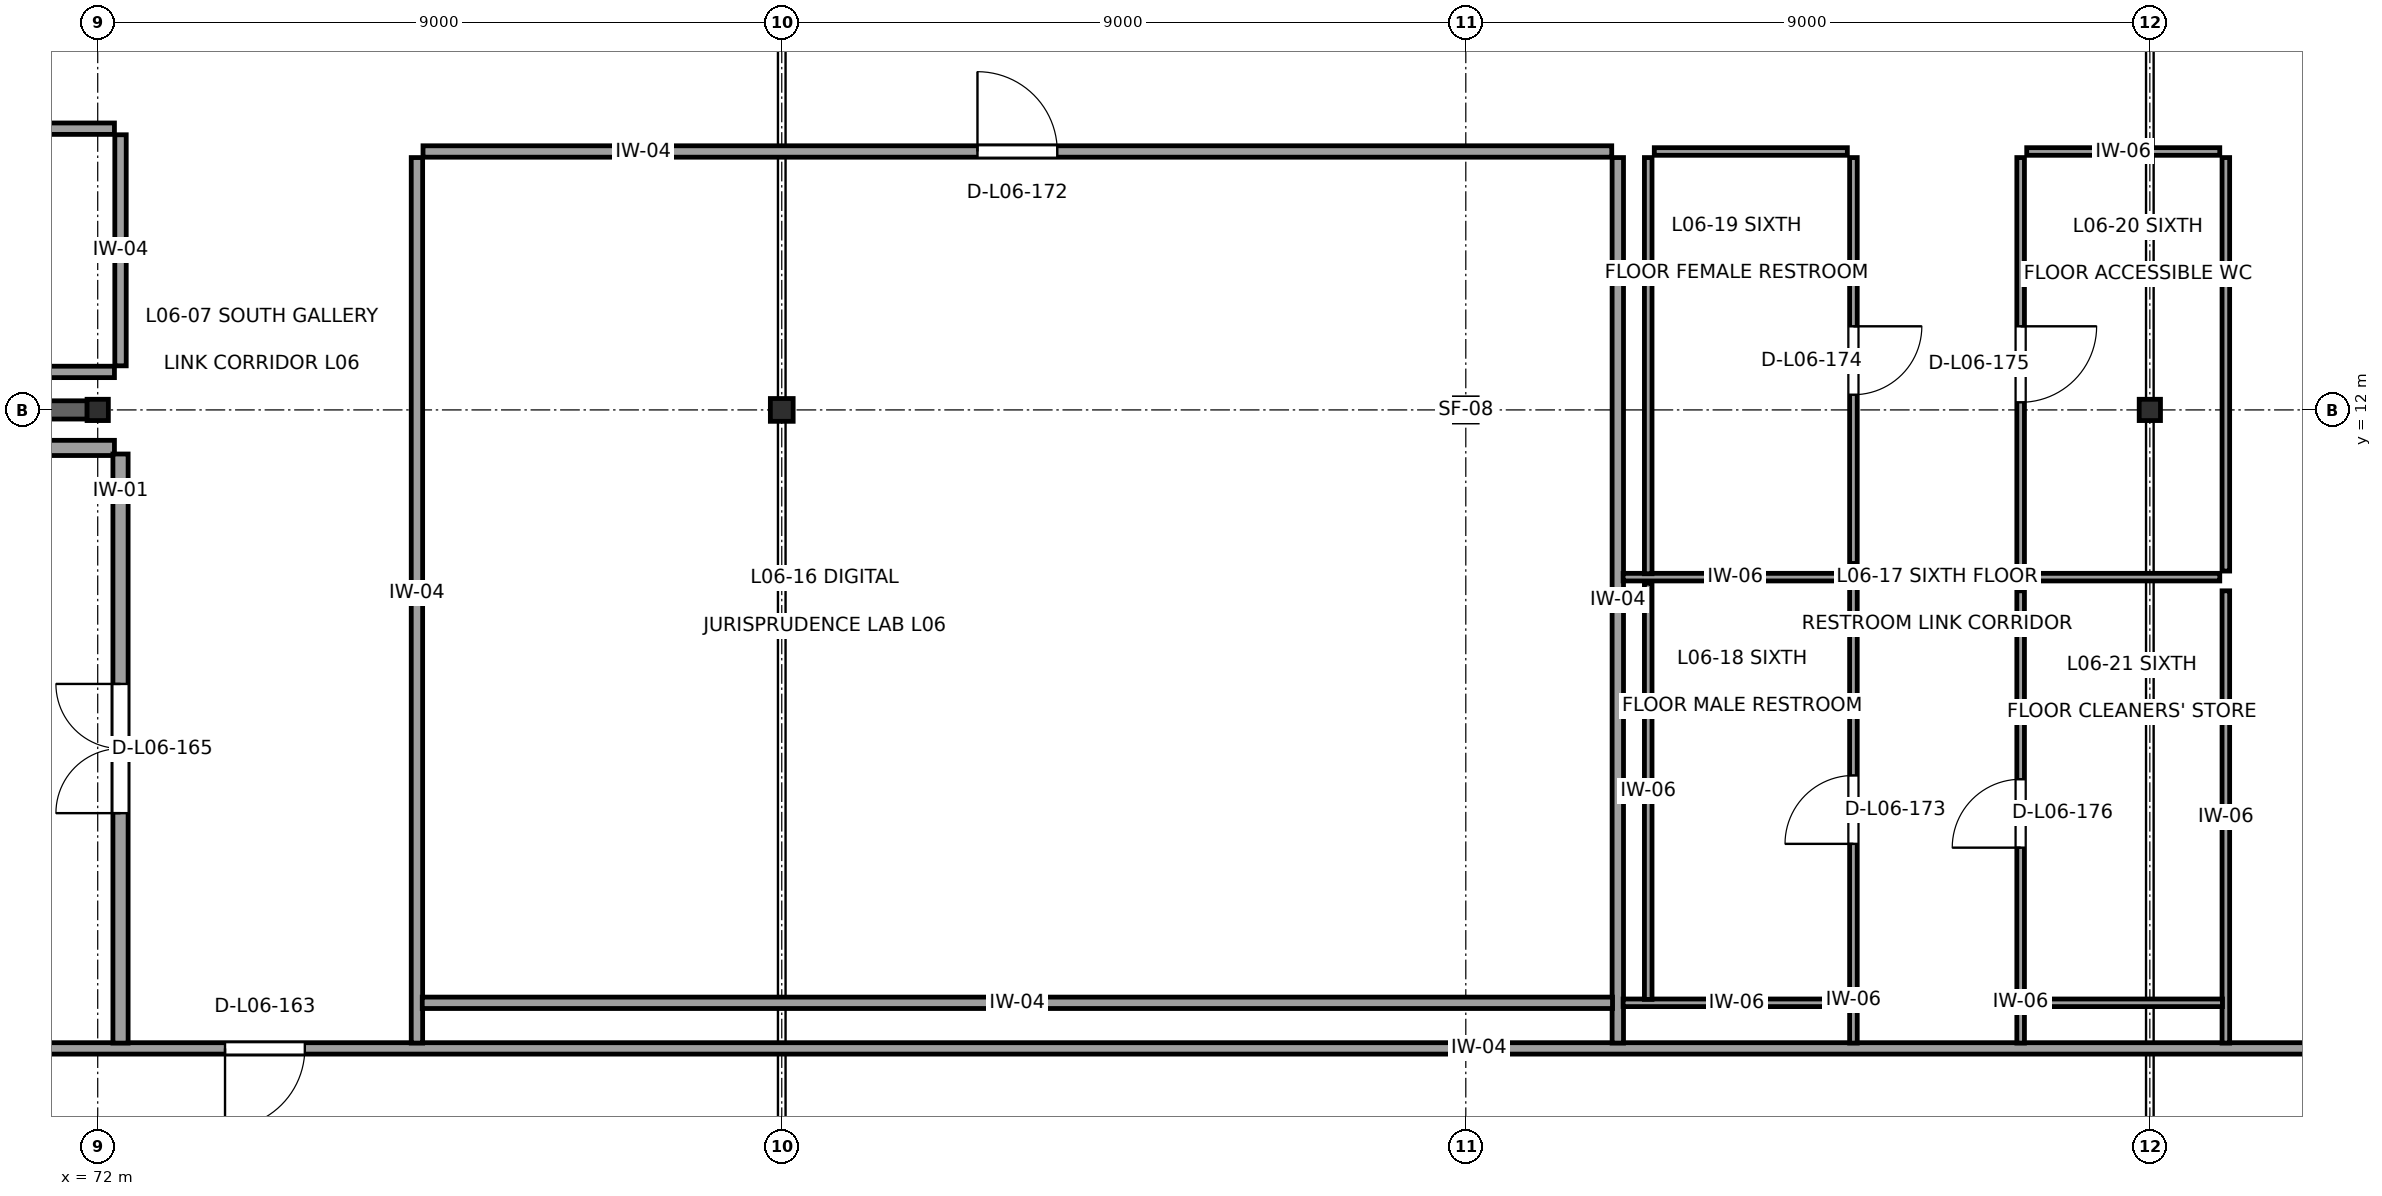
"""IFC4 building model, lengths in metres.
Left out: names, types, materials, properties, quantities, classifications, styles, units other than length and angle.
Written with IfcOpenShell. Run it as: python <this file> out.ifc"""

import sys

from ifc_helpers import new_model, si_unit, direction, frame, frame_2d, origin, origin_2d, place, context, subcontext, project, spatial, rectangle, i_section, extrude, element, fill, save


model = new_model("IFC4")
c1 = context("Model", 3, precision=1e-05, world=origin(), true_north=direction((0.0, 1.0)))
c2 = subcontext(c1, "Body", "Model", "MODEL_VIEW")
j1 = project(units=[si_unit("LENGTHUNIT", "METRE"), si_unit("PLANEANGLEUNIT", "RADIAN")], contexts=[c1])
p1 = place(None, origin())
s1 = spatial("IfcSite", under=j1, at=p1, CompositionType="ELEMENT")
p2 = place(p1, origin())
s2 = spatial("IfcBuilding", under=s1, at=p2, CompositionType="ELEMENT")
p3 = place(p2, frame((0.0, 0.0, 27.4)))
s3 = spatial("IfcBuildingStorey", under=s2, at=p3, CompositionType="ELEMENT", Elevation=27.4)
p4 = place(p3, frame((72.0, 12.0, 0.0), z_axis=(0.0, 0.0, 1.0), x_axis=(0.0, 1.0, 0.0)))
e1 = element("IfcColumn", 1, at=p4, inside=s3, PredefinedType="COLUMN", context=c2, shape_type="SweptSolid", body=[
    extrude(i_section(OverallWidth=0.28, OverallDepth=0.28, WebThickness=0.01, FlangeThickness=0.018, at=origin_2d()), origin(), (0.0, 0.0, 1.0), 4.0),
])
p5 = place(p3, frame((81.0, 12.0, 0.0), z_axis=(0.0, 0.0, 1.0), x_axis=(1.0, 0.0, 0.0)))
e2 = element("IfcColumn", 2, at=p5, inside=s3, PredefinedType="COLUMN", context=c2, shape_type="SweptSolid", body=[
    extrude(i_section(OverallWidth=0.3, OverallDepth=0.3, WebThickness=0.011, FlangeThickness=0.019, at=origin_2d()), origin(), (0.0, 0.0, 1.0), 4.0),
])
p6 = place(p3, frame((90.0, 12.0, 0.0), z_axis=(0.0, 0.0, 1.0), x_axis=(1.0, 0.0, 0.0)))
e3 = element("IfcColumn", 3, at=p6, inside=s3, PredefinedType="COLUMN", context=c2, shape_type="SweptSolid", body=[
    extrude(i_section(OverallWidth=0.3, OverallDepth=0.32, WebThickness=0.011, FlangeThickness=0.021, at=origin_2d()), origin(), (0.0, 0.0, 1.0), 4.0),
])
p7 = place(p3, frame((99.0, 12.0, 0.0), z_axis=(0.0, 0.0, 1.0), x_axis=(1.0, 0.0, 0.0)))
e4 = element("IfcColumn", 4, at=p7, inside=s3, PredefinedType="COLUMN", context=c2, shape_type="SweptSolid", body=[
    extrude(i_section(OverallWidth=0.28, OverallDepth=0.28, WebThickness=0.01, FlangeThickness=0.018, at=origin_2d()), origin(), (0.0, 0.0, 1.0), 4.0),
])
p8 = place(p3, frame((63.008, 12.0, 0.0), z_axis=(0.0, 0.0, 1.0), x_axis=(1.0, 0.0, 0.0)))
e5 = element("IfcWall", 5, at=p8, inside=s3, PredefinedType="SHEAR", context=c2, shape_type="SweptSolid", body=[
    extrude(rectangle(XDim=8.854, YDim=0.24, at=frame_2d((4.427, 0.0))), origin(), (0.0, 0.0, 1.0), 3.355),
])
p9 = place(p3, frame((45.88, 3.6, 0.0), z_axis=(0.0, 0.0, 1.0), x_axis=(1.0, 0.0, 0.0)))
e6 = element("IfcWall", 6, at=p9, inside=s3, PredefinedType="PARTITIONING", context=c2, shape_type="SweptSolid", body=[
    extrude(rectangle(XDim=58.24, YDim=0.15, at=frame_2d((29.12, 0.0))), origin(), (0.0, 0.0, 1.0), 3.64),
])
p10 = place(p9, frame((27.795, 0.0, 0.0)))
e7 = element("IfcOpeningElement", 7, at=p10, cuts=e6, PredefinedType="OPENING", context=c2, shape_type="SweptSolid", body=[
    extrude(rectangle(XDim=1.05, YDim=2.25, at=frame_2d((0.525, 1.125))), frame((0.0, 0.09, 0.0), z_axis=(0.0, -1.0, 0.0), x_axis=(1.0, 0.0, 0.0)), (0.0, 0.0, 1.0), 0.18),
])
p11 = place(p3, frame((62.795, 11.5, 0.0), z_axis=(0.0, 0.0, 1.0), x_axis=(1.0, 0.0, 0.0)))
e8 = element("IfcWall", 8, at=p11, inside=s3, PredefinedType="PARTITIONING", context=c2, shape_type="SweptSolid", body=[
    extrude(rectangle(XDim=9.425, YDim=0.2, at=frame_2d((4.712, 0.0))), origin(), (0.0, 0.0, 1.0), 3.64),
])
p12 = place(p3, frame((72.3, 11.42, 0.0), z_axis=(0.0, 0.0, 1.0), x_axis=(0.0, -1.0, 0.0)))
e9 = element("IfcWall", 9, at=p12, inside=s3, PredefinedType="PARTITIONING", context=c2, shape_type="SweptSolid", body=[
    extrude(rectangle(XDim=7.75, YDim=0.2, at=frame_2d((3.875, 0.0))), origin(), (0.0, 0.0, 1.0), 3.64),
])
p13 = place(p12, frame((3.025, 0.0, 0.0)))
e10 = element("IfcOpeningElement", 10, at=p13, cuts=e9, PredefinedType="OPENING", context=c2, shape_type="SweptSolid", body=[
    extrude(rectangle(XDim=1.7, YDim=2.4, at=frame_2d((0.85, 1.2))), frame((0.0, 0.115, 0.0), z_axis=(0.0, -1.0, 0.0), x_axis=(1.0, 0.0, 0.0)), (0.0, 0.0, 1.0), 0.23),
])
p14 = place(p3, frame((72.22, 12.5, 0.0), z_axis=(0.0, 0.0, 1.0), x_axis=(-1.0, 0.0, 0.0)))
e11 = element("IfcWall", 11, at=p14, inside=s3, PredefinedType="PARTITIONING", context=c2, shape_type="SweptSolid", body=[
    extrude(rectangle(XDim=9.425, YDim=0.15, at=frame_2d((4.712, 0.0))), origin(), (0.0, 0.0, 1.0), 3.64),
])
p15 = place(p3, frame((62.795, 15.7, 0.0), z_axis=(0.0, 0.0, 1.0), x_axis=(1.0, 0.0, 0.0)))
e12 = element("IfcWall", 12, at=p15, inside=s3, PredefinedType="PARTITIONING", context=c2, shape_type="SweptSolid", body=[
    extrude(rectangle(XDim=9.425, YDim=0.15, at=frame_2d((4.712, 0.0))), origin(), (0.0, 0.0, 1.0), 3.64),
])
p16 = place(p15, frame((4.187, 0.0, 0.0)))
e13 = element("IfcOpeningElement", 13, at=p16, cuts=e12, PredefinedType="OPENING", context=c2, shape_type="SweptSolid", body=[
    extrude(rectangle(XDim=1.05, YDim=2.25, at=frame_2d((0.525, 1.125))), frame((0.0, 0.09, 0.0), z_axis=(0.0, -1.0, 0.0), x_axis=(1.0, 0.0, 0.0)), (0.0, 0.0, 1.0), 0.18),
])
p17 = place(p3, frame((72.3, 15.62, 0.0), z_axis=(0.0, 0.0, 1.0), x_axis=(0.0, -1.0, 0.0)))
e14 = element("IfcWall", 14, at=p17, inside=s3, PredefinedType="PARTITIONING", context=c2, shape_type="SweptSolid", body=[
    extrude(rectangle(XDim=3.04, YDim=0.15, at=frame_2d((1.52, 0.0))), origin(), (0.0, 0.0, 1.0), 3.64),
])
p18 = place(p3, frame((76.2, 3.67, 0.0), z_axis=(0.0, 0.0, 1.0), x_axis=(0.0, 1.0, 0.0)))
e15 = element("IfcWall", 15, at=p18, inside=s3, PredefinedType="PARTITIONING", context=c2, shape_type="SweptSolid", body=[
    extrude(rectangle(XDim=11.65, YDim=0.15, at=frame_2d((5.825, 0.0))), origin(), (0.0, 0.0, 1.0), 3.64),
])
p19 = place(p3, frame((76.28, 15.4, 0.0), z_axis=(0.0, 0.0, 1.0), x_axis=(1.0, 0.0, 0.0)))
e16 = element("IfcWall", 16, at=p19, inside=s3, PredefinedType="PARTITIONING", context=c2, shape_type="SweptSolid", body=[
    extrude(rectangle(XDim=15.64, YDim=0.15, at=frame_2d((7.82, 0.0))), origin(), (0.0, 0.0, 1.0), 3.64),
])
p20 = place(p19, frame((7.295, 0.0, 0.0)))
e17 = element("IfcOpeningElement", 17, at=p20, cuts=e16, PredefinedType="OPENING", context=c2, shape_type="SweptSolid", body=[
    extrude(rectangle(XDim=1.05, YDim=2.25, at=frame_2d((0.525, 1.125))), frame((0.0, 0.09, 0.0), z_axis=(0.0, -1.0, 0.0), x_axis=(1.0, 0.0, 0.0)), (0.0, 0.0, 1.0), 0.18),
])
p21 = place(p3, frame((92.0, 15.32, 0.0), z_axis=(0.0, 0.0, 1.0), x_axis=(0.0, -1.0, 0.0)))
e18 = element("IfcWall", 18, at=p21, inside=s3, PredefinedType="PARTITIONING", context=c2, shape_type="SweptSolid", body=[
    extrude(rectangle(XDim=11.65, YDim=0.15, at=frame_2d((5.825, 0.0))), origin(), (0.0, 0.0, 1.0), 3.64),
])
p22 = place(p3, frame((91.93, 4.2, 0.0), z_axis=(0.0, 0.0, 1.0), x_axis=(-1.0, 0.0, 0.0)))
e19 = element("IfcWall", 19, at=p22, inside=s3, PredefinedType="PARTITIONING", context=c2, shape_type="SweptSolid", body=[
    extrude(rectangle(XDim=15.66, YDim=0.15, at=frame_2d((7.83, 0.0))), origin(), (0.0, 0.0, 1.0), 3.64),
])
p23 = place(p3, frame((95.1, 9.72, 0.0), z_axis=(0.0, 0.0, 1.0), x_axis=(0.0, -1.0, 0.0)))
e20 = element("IfcWall", 20, at=p23, inside=s3, PredefinedType="PARTITIONING", context=c2, shape_type="SweptSolid", body=[
    extrude(rectangle(XDim=6.05, YDim=0.1, at=frame_2d((3.025, 0.0))), origin(), (0.0, 0.0, 1.0), 3.64),
])
p24 = place(p23, frame((2.529, 0.0, 0.0)))
e21 = element("IfcOpeningElement", 21, at=p24, cuts=e20, PredefinedType="OPENING", context=c2, shape_type="SweptSolid", body=[
    extrude(rectangle(XDim=0.9, YDim=2.05, at=frame_2d((0.45, 1.025))), frame((0.0, 0.065, 0.0), z_axis=(0.0, -1.0, 0.0), x_axis=(1.0, 0.0, 0.0)), (0.0, 0.0, 1.0), 0.13),
])
p25 = place(p3, frame((95.055, 4.2, 0.0), z_axis=(0.0, 0.0, 1.0), x_axis=(-1.0, 0.0, 0.0)))
e22 = element("IfcWall", 22, at=p25, inside=s3, PredefinedType="PARTITIONING", context=c2, shape_type="SweptSolid", body=[
    extrude(rectangle(XDim=2.985, YDim=0.1, at=frame_2d((1.492, 0.0))), origin(), (0.0, 0.0, 1.0), 3.64),
])
p26 = place(p3, frame((92.4, 4.245, 0.0), z_axis=(0.0, 0.0, 1.0), x_axis=(0.0, 1.0, 0.0)))
e23 = element("IfcWall", 23, at=p26, inside=s3, PredefinedType="PARTITIONING", context=c2, shape_type="SweptSolid", body=[
    extrude(rectangle(XDim=5.475, YDim=0.1, at=frame_2d((2.737, 0.0))), origin(), (0.0, 0.0, 1.0), 3.64),
])
p27 = place(p3, frame((92.07, 9.8, 0.0), z_axis=(0.0, 0.0, 1.0), x_axis=(1.0, 0.0, 0.0)))
e24 = element("IfcWall", 24, at=p27, inside=s3, PredefinedType="PARTITIONING", context=c2, shape_type="SweptSolid", body=[
    extrude(rectangle(XDim=2.95, YDim=0.1, at=frame_2d((1.475, 0.0))), origin(), (0.0, 0.0, 1.0), 3.64),
])
p28 = place(p3, frame((92.4, 9.845, 0.0), z_axis=(0.0, 0.0, 1.0), x_axis=(0.0, 1.0, 0.0)))
e25 = element("IfcWall", 25, at=p28, inside=s3, PredefinedType="PARTITIONING", context=c2, shape_type="SweptSolid", body=[
    extrude(rectangle(XDim=5.475, YDim=0.1, at=frame_2d((2.738, 0.0))), origin(), (0.0, 0.0, 1.0), 3.64),
])
p29 = place(p3, frame((92.48, 15.4, 0.0), z_axis=(0.0, 0.0, 1.0), x_axis=(1.0, 0.0, 0.0)))
e26 = element("IfcWall", 26, at=p29, inside=s3, PredefinedType="PARTITIONING", context=c2, shape_type="SweptSolid", body=[
    extrude(rectangle(XDim=2.54, YDim=0.1, at=frame_2d((1.27, 0.0))), origin(), (0.0, 0.0, 1.0), 3.64),
])
p30 = place(p3, frame((95.1, 15.32, 0.0), z_axis=(0.0, 0.0, 1.0), x_axis=(0.0, -1.0, 0.0)))
e27 = element("IfcWall", 27, at=p30, inside=s3, PredefinedType="PARTITIONING", context=c2, shape_type="SweptSolid", body=[
    extrude(rectangle(XDim=5.34, YDim=0.1, at=frame_2d((2.67, 0.0))), origin(), (0.0, 0.0, 1.0), 3.64),
])
p31 = place(p30, frame((2.22, 0.0, 0.0)))
e28 = element("IfcOpeningElement", 28, at=p31, cuts=e27, PredefinedType="OPENING", context=c2, shape_type="SweptSolid", body=[
    extrude(rectangle(XDim=0.9, YDim=2.05, at=frame_2d((0.45, 1.025))), frame((0.0, 0.065, 0.0), z_axis=(0.0, -1.0, 0.0), x_axis=(1.0, 0.0, 0.0)), (0.0, 0.0, 1.0), 0.13),
])
p32 = place(p3, frame((97.3, 9.88, 0.0), z_axis=(0.0, 0.0, 1.0), x_axis=(0.0, 1.0, 0.0)))
e29 = element("IfcWall", 29, at=p32, inside=s3, PredefinedType="PARTITIONING", context=c2, shape_type="SweptSolid", body=[
    extrude(rectangle(XDim=5.44, YDim=0.1, at=frame_2d((2.72, 0.0))), origin(), (0.0, 0.0, 1.0), 3.64),
])
p33 = place(p32, frame((2.22, 0.0, 0.0)))
e30 = element("IfcOpeningElement", 30, at=p33, cuts=e29, PredefinedType="OPENING", context=c2, shape_type="SweptSolid", body=[
    extrude(rectangle(XDim=1.0, YDim=2.1, at=frame_2d((0.5, 1.05))), frame((0.0, 0.065, 0.0), z_axis=(0.0, -1.0, 0.0), x_axis=(1.0, 0.0, 0.0)), (0.0, 0.0, 1.0), 0.13),
])
p34 = place(p3, frame((97.38, 15.4, 0.0), z_axis=(0.0, 0.0, 1.0), x_axis=(1.0, 0.0, 0.0)))
e31 = element("IfcWall", 31, at=p34, inside=s3, PredefinedType="PARTITIONING", context=c2, shape_type="SweptSolid", body=[
    extrude(rectangle(XDim=2.54, YDim=0.1, at=frame_2d((1.27, 0.0))), origin(), (0.0, 0.0, 1.0), 3.64),
])
p35 = place(p3, frame((100.0, 15.32, 0.0), z_axis=(0.0, 0.0, 1.0), x_axis=(0.0, -1.0, 0.0)))
e32 = element("IfcWall", 32, at=p35, inside=s3, PredefinedType="PARTITIONING", context=c2, shape_type="SweptSolid", body=[
    extrude(rectangle(XDim=5.44, YDim=0.1, at=frame_2d((2.72, 0.0))), origin(), (0.0, 0.0, 1.0), 3.64),
])
p36 = place(p3, frame((99.92, 9.8, 0.0), z_axis=(0.0, 0.0, 1.0), x_axis=(-1.0, 0.0, 0.0)))
e33 = element("IfcWall", 33, at=p36, inside=s3, PredefinedType="PARTITIONING", context=c2, shape_type="SweptSolid", body=[
    extrude(rectangle(XDim=2.54, YDim=0.1, at=frame_2d((1.27, 0.0))), origin(), (0.0, 0.0, 1.0), 3.64),
])
p37 = place(p3, frame((100.0, 9.62, 0.0), z_axis=(0.0, 0.0, 1.0), x_axis=(0.0, -1.0, 0.0)))
e34 = element("IfcWall", 34, at=p37, inside=s3, PredefinedType="PARTITIONING", context=c2, shape_type="SweptSolid", body=[
    extrude(rectangle(XDim=5.95, YDim=0.1, at=frame_2d((2.975, 0.0))), origin(), (0.0, 0.0, 1.0), 3.64),
])
p38 = place(p3, frame((99.955, 4.2, 0.0), z_axis=(0.0, 0.0, 1.0), x_axis=(-1.0, 0.0, 0.0)))
e35 = element("IfcWall", 35, at=p38, inside=s3, PredefinedType="PARTITIONING", context=c2, shape_type="SweptSolid", body=[
    extrude(rectangle(XDim=2.575, YDim=0.1, at=frame_2d((1.288, 0.0))), origin(), (0.0, 0.0, 1.0), 3.64),
])
p39 = place(p3, frame((97.3, 3.67, 0.0), z_axis=(0.0, 0.0, 1.0), x_axis=(0.0, 1.0, 0.0)))
e36 = element("IfcWall", 36, at=p39, inside=s3, PredefinedType="PARTITIONING", context=c2, shape_type="SweptSolid", body=[
    extrude(rectangle(XDim=5.95, YDim=0.1, at=frame_2d((2.975, 0.0))), origin(), (0.0, 0.0, 1.0), 3.64),
])
p40 = place(p39, frame((2.571, 0.0, 0.0)))
e37 = element("IfcOpeningElement", 37, at=p40, cuts=e36, PredefinedType="OPENING", context=c2, shape_type="SweptSolid", body=[
    extrude(rectangle(XDim=0.9, YDim=2.05, at=frame_2d((0.45, 1.025))), frame((0.0, 0.065, 0.0), z_axis=(0.0, -1.0, 0.0), x_axis=(1.0, 0.0, 0.0)), (0.0, 0.0, 1.0), 0.13),
])
p41 = place(p10, frame((1.05, 0.0, 0.0), z_axis=(0.0, 0.0, 1.0), x_axis=(-1.0, 0.0, 0.0)))
e38 = element("IfcDoor", 38, at=p41, inside=s3, OperationType="SINGLE_SWING_LEFT", PredefinedType="DOOR", context=c2, shape_type="SweptSolid", body=[
    extrude(rectangle(XDim=1.05, YDim=2.25, at=frame_2d((0.525, 1.125))), frame((0.0, 0.025, 0.0), z_axis=(0.0, -1.0, 0.0), x_axis=(1.0, 0.0, 0.0)), (0.0, 0.0, 1.0), 0.05),
])
fill(e7, e38)
p42 = place(p13, frame((1.7, 0.0, 0.0), z_axis=(0.0, 0.0, 1.0), x_axis=(-1.0, 0.0, 0.0)))
e39 = element("IfcDoor", 39, at=p42, inside=s3, OperationType="DOUBLE_DOOR_SINGLE_SWING", PredefinedType="DOOR", context=c2, shape_type="SweptSolid", body=[
    extrude(rectangle(XDim=1.7, YDim=2.4, at=frame_2d((0.85, 1.2))), frame((0.0, 0.025, 0.0), z_axis=(0.0, -1.0, 0.0), x_axis=(1.0, 0.0, 0.0)), (0.0, 0.0, 1.0), 0.05),
])
fill(e10, e39)
p43 = place(p20, origin())
e40 = element("IfcDoor", 40, at=p43, inside=s3, OperationType="SINGLE_SWING_LEFT", PredefinedType="DOOR", context=c2, shape_type="SweptSolid", body=[
    extrude(rectangle(XDim=1.05, YDim=2.25, at=frame_2d((0.525, 1.125))), frame((0.0, 0.025, 0.0), z_axis=(0.0, -1.0, 0.0), x_axis=(1.0, 0.0, 0.0)), (0.0, 0.0, 1.0), 0.05),
])
fill(e17, e40)
p44 = place(p24, frame((0.9, 0.0, 0.0), z_axis=(0.0, 0.0, 1.0), x_axis=(-1.0, 0.0, 0.0)))
e41 = element("IfcDoor", 41, at=p44, inside=s3, OperationType="SINGLE_SWING_RIGHT", PredefinedType="DOOR", context=c2, shape_type="SweptSolid", body=[
    extrude(rectangle(XDim=0.9, YDim=2.05, at=frame_2d((0.45, 1.025))), frame((0.0, 0.025, 0.0), z_axis=(0.0, -1.0, 0.0), x_axis=(1.0, 0.0, 0.0)), (0.0, 0.0, 1.0), 0.05),
])
fill(e21, e41)
p45 = place(p31, origin())
e42 = element("IfcDoor", 42, at=p45, inside=s3, OperationType="SINGLE_SWING_LEFT", PredefinedType="DOOR", context=c2, shape_type="SweptSolid", body=[
    extrude(rectangle(XDim=0.9, YDim=2.05, at=frame_2d((0.45, 1.025))), frame((0.0, 0.025, 0.0), z_axis=(0.0, -1.0, 0.0), x_axis=(1.0, 0.0, 0.0)), (0.0, 0.0, 1.0), 0.05),
])
fill(e28, e42)
p46 = place(p33, frame((1.0, 0.0, 0.0), z_axis=(0.0, 0.0, 1.0), x_axis=(-1.0, 0.0, 0.0)))
e43 = element("IfcDoor", 43, at=p46, inside=s3, OperationType="SINGLE_SWING_RIGHT", PredefinedType="DOOR", context=c2, shape_type="SweptSolid", body=[
    extrude(rectangle(XDim=1.0, YDim=2.1, at=frame_2d((0.5, 1.05))), frame((0.0, 0.025, 0.0), z_axis=(0.0, -1.0, 0.0), x_axis=(1.0, 0.0, 0.0)), (0.0, 0.0, 1.0), 0.05),
])
fill(e30, e43)
p47 = place(p40, origin())
e44 = element("IfcDoor", 44, at=p47, inside=s3, OperationType="SINGLE_SWING_LEFT", PredefinedType="DOOR", context=c2, shape_type="SweptSolid", body=[
    extrude(rectangle(XDim=0.9, YDim=2.05, at=frame_2d((0.45, 1.025))), frame((0.0, 0.025, 0.0), z_axis=(0.0, -1.0, 0.0), x_axis=(1.0, 0.0, 0.0)), (0.0, 0.0, 1.0), 0.05),
])
fill(e37, e44)
save(model, sys.argv[1])
